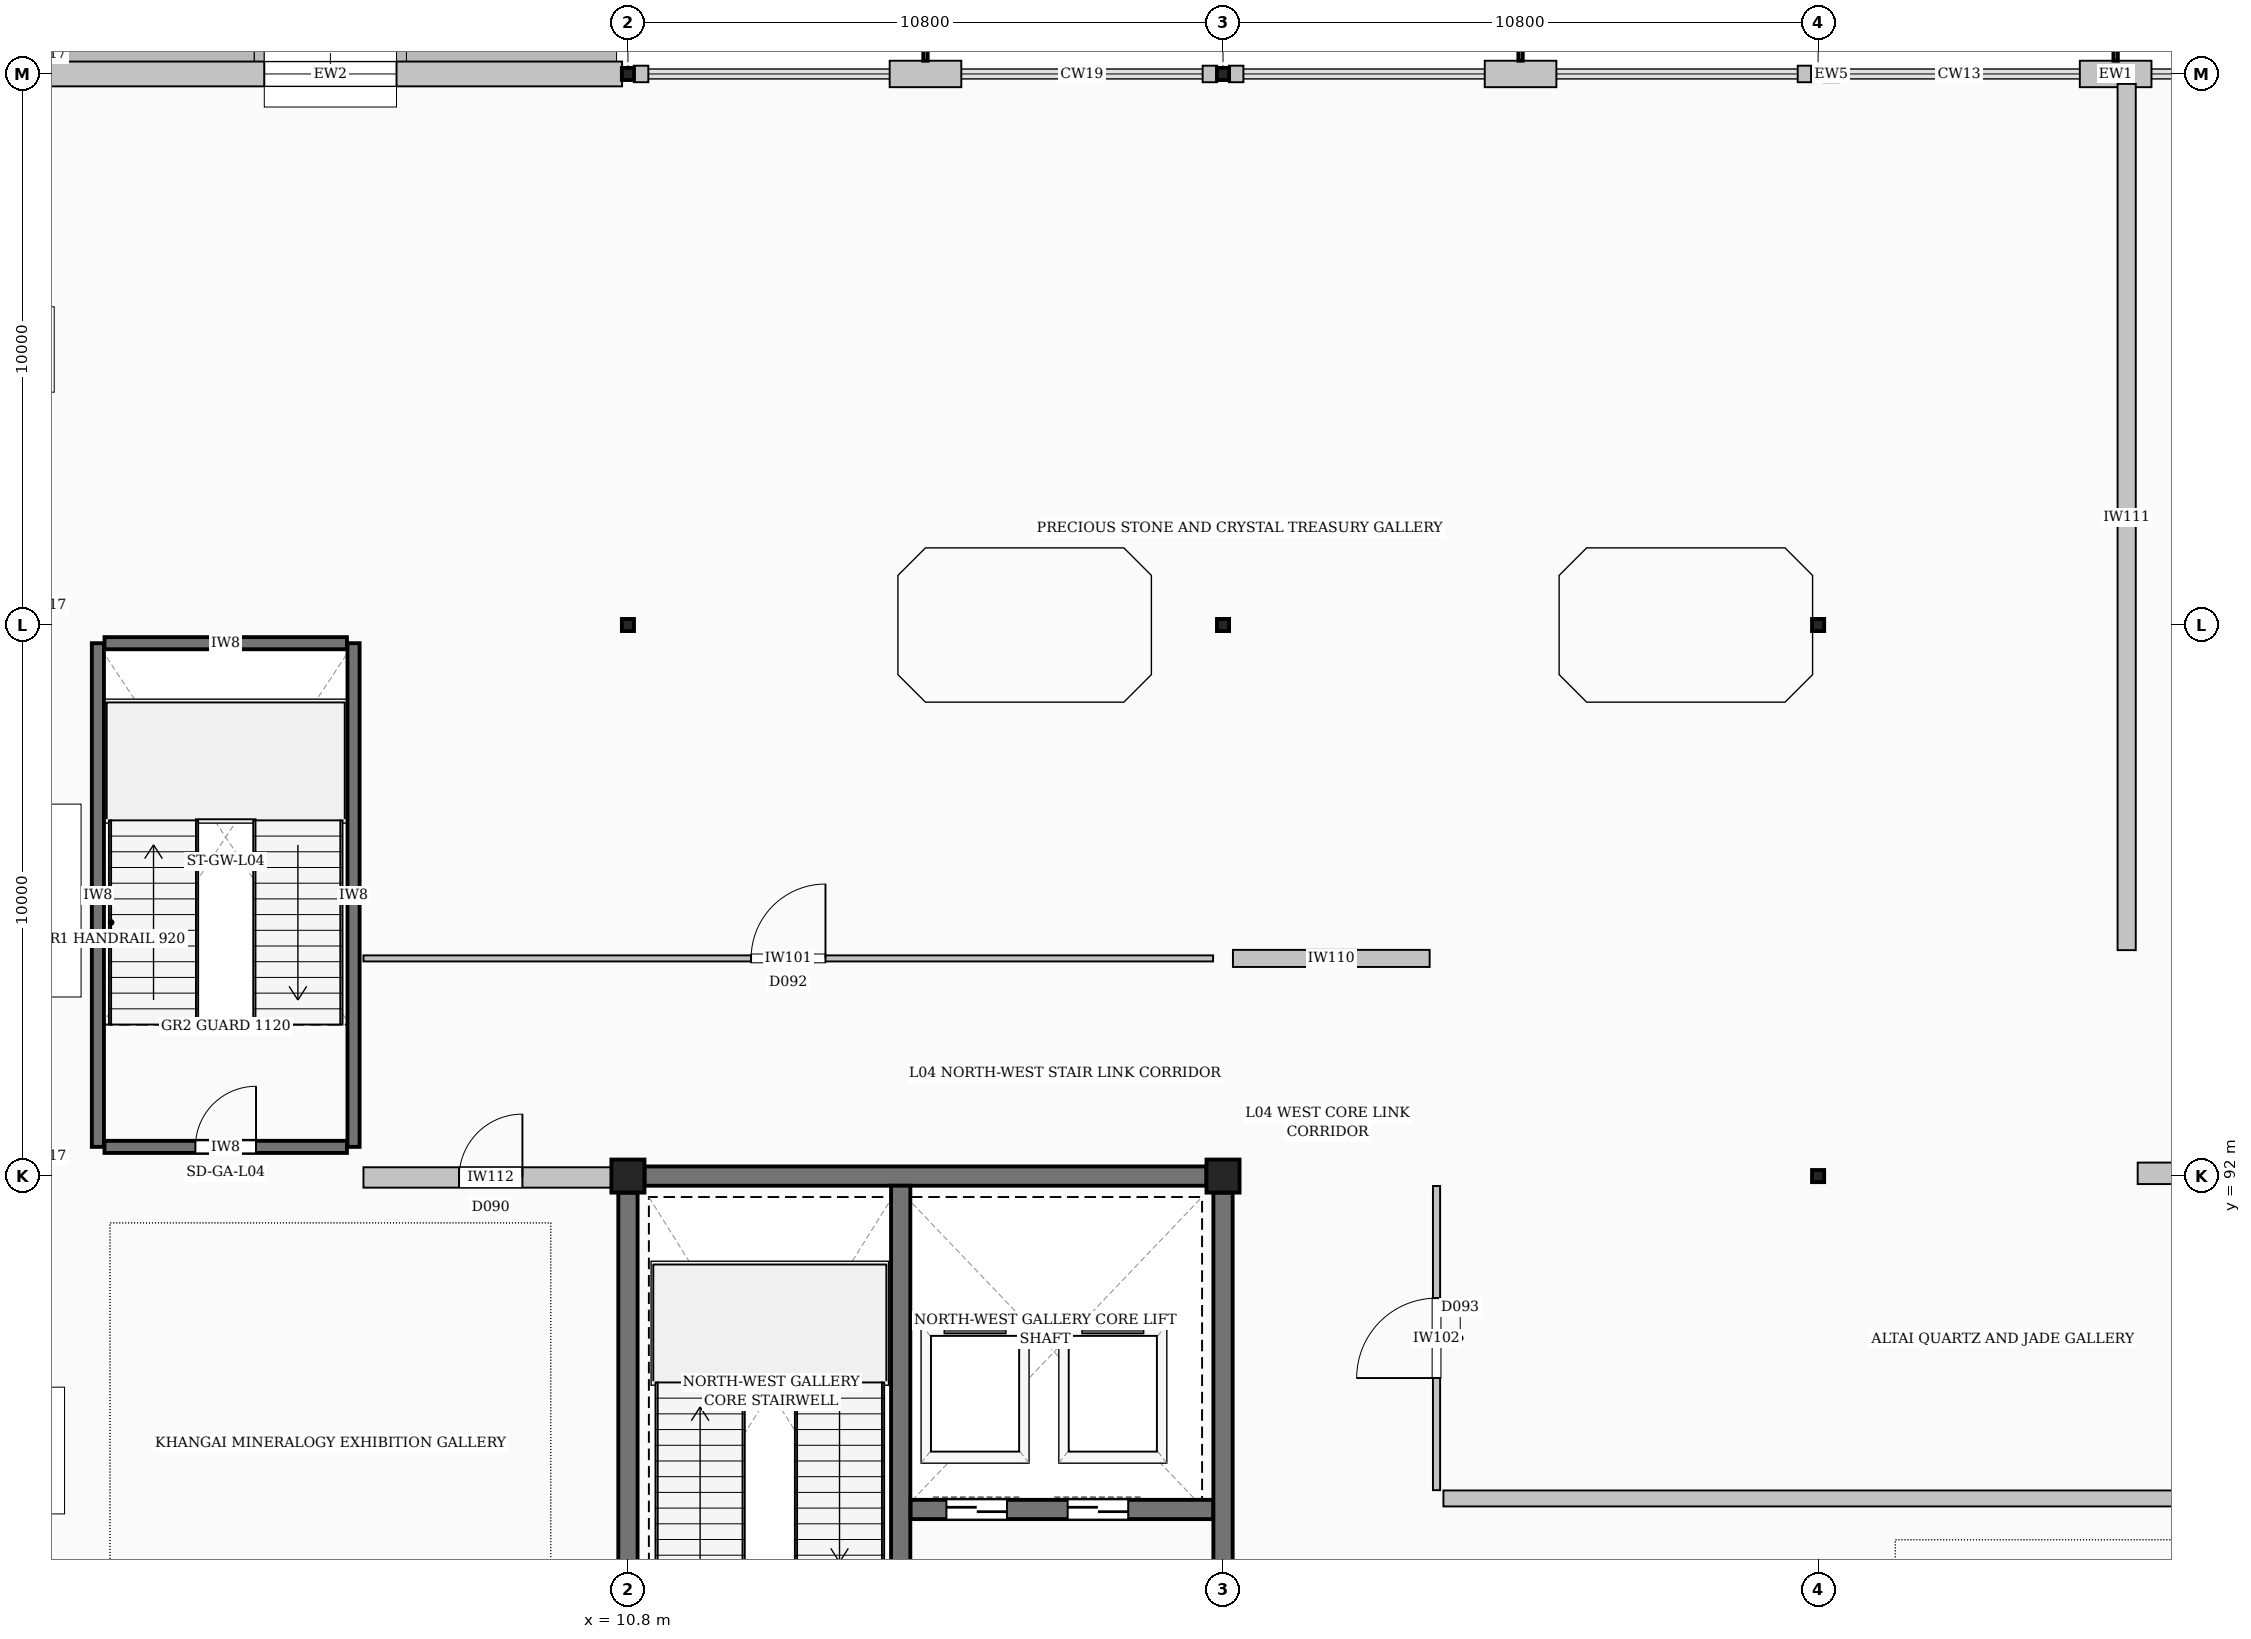
"""IFC4 building model, lengths in metres.
Left out: names, types, materials, properties, quantities, classifications, styles, units other than length and angle.
Written with IfcOpenShell. Run it as: python <this file> out.ifc"""

import sys

from ifc_helpers import new_model, si_unit, direction, frame, frame_2d, origin, origin_2d, place, context, subcontext, project, spatial, rectangle, hollow_rectangle, extrude, element, fill, save


model = new_model("IFC4")
c1 = context("Model", 3, precision=1e-05, world=origin(), true_north=direction((0.0, 1.0)))
c2 = subcontext(c1, "Body", "Model", "MODEL_VIEW")
j1 = project(units=[si_unit("LENGTHUNIT", "METRE"), si_unit("PLANEANGLEUNIT", "RADIAN")], contexts=[c1])
p1 = place(None, origin())
s1 = spatial("IfcSite", under=j1, at=p1, CompositionType="ELEMENT")
p2 = place(p1, origin())
s2 = spatial("IfcBuilding", under=s1, at=p2, CompositionType="ELEMENT")
p3 = place(p2, frame((0.0, 0.0, 24.0)))
s3 = spatial("IfcBuildingStorey", under=s2, at=p3, CompositionType="ELEMENT", Elevation=24.0)
p4 = place(p3, frame((10.8, 92.0, 0.0), z_axis=(0.0, 0.0, 1.0), x_axis=(1.0, 0.0, 0.0)))
e1 = element("IfcColumn", 1, at=p4, inside=s3, PredefinedType="COLUMN", context=c2, shape_type="SweptSolid", body=[
    extrude(rectangle(XDim=0.6, YDim=0.6, at=origin_2d()), origin(), (0.0, 0.0, 1.0), 4.8),
])
for number, where, z_axis, x_axis in (
    (2, (10.8, 102.0, 0.0), (0.0, 0.0, 1.0), (1.0, 0.0, 0.0)),
    (3, (10.8, 112.0, 0.0), (0.0, 0.0, 1.0), (1.0, 0.0, 0.0)),
):
    element("IfcColumn", number, at=place(p3, frame(where, z_axis=z_axis, x_axis=x_axis)), inside=s3, PredefinedType="COLUMN", context=c2, shape_type="SweptSolid", body=[
        extrude(hollow_rectangle(XDim=0.22, YDim=0.22, WallThickness=0.012, InnerFilletRadius=0.012, OuterFilletRadius=0.025, at=origin_2d()), origin(), (0.0, 0.0, 1.0), 4.8),
    ])
p5 = place(p3, frame((21.6, 92.0, 0.0), z_axis=(0.0, 0.0, 1.0), x_axis=(1.0, 0.0, 0.0)))
e4 = element("IfcColumn", 4, at=p5, inside=s3, PredefinedType="COLUMN", context=c2, shape_type="SweptSolid", body=[
    extrude(rectangle(XDim=0.6, YDim=0.6, at=origin_2d()), origin(), (0.0, 0.0, 1.0), 4.8),
])
for number, where, z_axis, x_axis in (
    (5, (21.6, 102.0, 0.0), (0.0, 0.0, 1.0), (1.0, 0.0, 0.0)),
    (6, (21.6, 112.0, 0.0), (0.0, 0.0, 1.0), (1.0, 0.0, 0.0)),
    (7, (32.4, 92.0, 0.0), (0.0, 0.0, 1.0), (1.0, 0.0, 0.0)),
    (8, (32.4, 102.0, 0.0), (0.0, 0.0, 1.0), (1.0, 0.0, 0.0)),
    (9, (32.4, 112.0, 0.0), (0.0, 0.0, 1.0), (1.0, 0.0, 0.0)),
):
    element("IfcColumn", number, at=place(p3, frame(where, z_axis=z_axis, x_axis=x_axis)), inside=s3, PredefinedType="COLUMN", context=c2, shape_type="SweptSolid", body=[
        extrude(hollow_rectangle(XDim=0.22, YDim=0.22, WallThickness=0.012, InnerFilletRadius=0.012, OuterFilletRadius=0.025, at=origin_2d()), origin(), (0.0, 0.0, 1.0), 4.8),
    ])
p6 = place(p3, frame((38.45, 112.0, 0.0), z_axis=(0.0, 0.0, 1.0), x_axis=(-1.0, 0.0, 0.0)))
e10 = element("IfcWall", 10, at=p6, inside=s3, PredefinedType="STANDARD", context=c2, shape_type="SweptSolid", body=[
    extrude(rectangle(XDim=1.3, YDim=0.48, at=frame_2d((0.65, 0.0))), origin(), (0.0, 0.0, 1.0), 4.219),
])
p7 = place(p3, frame((32.77, 112.0, 0.0), z_axis=(0.0, 0.0, 1.0), x_axis=(-1.0, 0.0, 0.0)))
e11 = element("IfcWall", 11, at=p7, inside=s3, PredefinedType="STANDARD", context=c2, shape_type="SweptSolid", body=[
    extrude(rectangle(XDim=0.264, YDim=0.3, at=frame_2d((0.132, 0.0))), origin(), (0.0, 0.0, 1.0), 4.56),
])
p8 = place(p3, frame((27.65, 112.0, 0.0), z_axis=(0.0, 0.0, 1.0), x_axis=(-1.0, 0.0, 0.0)))
e12 = element("IfcWall", 12, at=p8, inside=s3, PredefinedType="STANDARD", context=c2, shape_type="SweptSolid", body=[
    extrude(rectangle(XDim=1.3, YDim=0.48, at=frame_2d((0.65, 0.0))), origin(), (0.0, 0.0, 1.0), 4.219),
])
for number, where, z_axis, x_axis in (
    (13, (32.294, 112.0, 0.0), (0.0, 0.0, 1.0), (-1.0, 0.0, 0.0)),
    (14, (21.97, 112.0, 0.0), (0.0, 0.0, 1.0), (-1.0, 0.0, 0.0)),
):
    element("IfcWall", number, at=place(p3, frame(where, z_axis=z_axis, x_axis=x_axis)), inside=s3, PredefinedType="STANDARD", context=c2, shape_type="SweptSolid", body=[
        extrude(rectangle(XDim=0.264, YDim=0.3, at=frame_2d((0.132, 0.0))), origin(), (0.0, 0.0, 1.0), 4.56),
    ])
p9 = place(p3, frame((16.85, 112.0, 0.0), z_axis=(0.0, 0.0, 1.0), x_axis=(-1.0, 0.0, 0.0)))
e15 = element("IfcWall", 15, at=p9, inside=s3, PredefinedType="STANDARD", context=c2, shape_type="SweptSolid", body=[
    extrude(rectangle(XDim=1.3, YDim=0.48, at=frame_2d((0.65, 0.0))), origin(), (0.0, 0.0, 1.0), 4.219),
])
for number, where, z_axis, x_axis in (
    (16, (21.494, 112.0, 0.0), (0.0, 0.0, 1.0), (-1.0, 0.0, 0.0)),
    (17, (11.17, 112.0, 0.0), (0.0, 0.0, 1.0), (-1.0, 0.0, 0.0)),
):
    element("IfcWall", number, at=place(p3, frame(where, z_axis=z_axis, x_axis=x_axis)), inside=s3, PredefinedType="STANDARD", context=c2, shape_type="SweptSolid", body=[
        extrude(rectangle(XDim=0.264, YDim=0.3, at=frame_2d((0.132, 0.0))), origin(), (0.0, 0.0, 1.0), 4.56),
    ])
p10 = place(p3, frame((10.694, 112.0, 0.0), z_axis=(0.0, 0.0, 1.0), x_axis=(-1.0, 0.0, 0.0)))
e18 = element("IfcWall", 18, at=p10, inside=s3, PredefinedType="STANDARD", context=c2, shape_type="SweptSolid", body=[
    extrude(rectangle(XDim=10.588, YDim=0.45, at=frame_2d((5.294, 0.0))), origin(), (0.0, 0.0, 1.0), 4.219),
])
p11 = place(p10, frame((4.094, 0.0, 1.0)))
e19 = element("IfcOpeningElement", 19, at=p11, cuts=e18, PredefinedType="OPENING", context=c2, shape_type="SweptSolid", body=[
    extrude(rectangle(XDim=2.4, YDim=2.4, at=frame_2d((1.2, 1.2))), frame((0.0, 0.235, 0.0), z_axis=(0.0, -1.0, 0.0), x_axis=(1.0, 0.0, 0.0)), (0.0, 0.0, 1.0), 0.47),
])
p12 = place(p3, frame((11.1, 92.0, 0.0), z_axis=(0.0, 0.0, 1.0), x_axis=(1.0, 0.0, 0.0)))
e20 = element("IfcWall", 20, at=p12, inside=s3, PredefinedType="SHEAR", context=c2, shape_type="SweptSolid", body=[
    extrude(rectangle(XDim=10.2, YDim=0.35, at=frame_2d((5.1, 0.0))), origin(), (0.0, 0.0, 1.0), 4.56),
])
p13 = place(p3, frame((10.8, 82.3, 0.0), z_axis=(0.0, 0.0, 1.0), x_axis=(0.0, 1.0, 0.0)))
e21 = element("IfcWall", 21, at=p13, inside=s3, PredefinedType="SHEAR", context=c2, shape_type="SweptSolid", body=[
    extrude(rectangle(XDim=9.4, YDim=0.35, at=frame_2d((4.7, 0.0))), origin(), (0.0, 0.0, 1.0), 4.56),
])
p14 = place(p3, frame((21.6, 82.3, 0.0), z_axis=(0.0, 0.0, 1.0), x_axis=(0.0, 1.0, 0.0)))
e22 = element("IfcWall", 22, at=p14, inside=s3, PredefinedType="SHEAR", context=c2, shape_type="SweptSolid", body=[
    extrude(rectangle(XDim=9.4, YDim=0.35, at=frame_2d((4.7, 0.0))), origin(), (0.0, 0.0, 1.0), 4.56),
])
p15 = place(p14, frame((0.88, 0.0, 0.0)))
e23 = element("IfcOpeningElement", 23, at=p15, cuts=e22, PredefinedType="OPENING", context=c2, shape_type="SweptSolid", body=[
    extrude(rectangle(XDim=1.8, YDim=2.25, at=frame_2d((0.9, 1.125))), frame((0.0, 0.185, 0.0), z_axis=(0.0, -1.0, 0.0), x_axis=(1.0, 0.0, 0.0)), (0.0, 0.0, 1.0), 0.37),
])
p16 = place(p3, frame((15.75, 82.22, 0.0), z_axis=(0.0, 0.0, 1.0), x_axis=(0.0, 1.0, 0.0)))
e24 = element("IfcWall", 24, at=p16, inside=s3, PredefinedType="SHEAR", context=c2, shape_type="SweptSolid", body=[
    extrude(rectangle(XDim=9.605, YDim=0.35, at=frame_2d((4.802, 0.0))), origin(), (0.0, 0.0, 1.0), 4.56),
])
p17 = place(p16, frame((0.9, 0.0, 0.0)))
e25 = element("IfcOpeningElement", 25, at=p17, cuts=e24, PredefinedType="OPENING", context=c2, shape_type="SweptSolid", body=[
    extrude(rectangle(XDim=1.1, YDim=2.2, at=frame_2d((0.55, 1.1))), frame((0.0, 0.185, 0.0), z_axis=(0.0, -1.0, 0.0), x_axis=(1.0, 0.0, 0.0)), (0.0, 0.0, 1.0), 0.37),
])
p18 = place(p3, frame((15.93, 85.95, 0.0), z_axis=(0.0, 0.0, 1.0), x_axis=(1.0, 0.0, 0.0)))
e26 = element("IfcWall", 26, at=p18, inside=s3, PredefinedType="SHEAR", context=c2, shape_type="SweptSolid", body=[
    extrude(rectangle(XDim=5.49, YDim=0.35, at=frame_2d((2.745, 0.0))), origin(), (0.0, 0.0, 1.0), 4.56),
])
p19 = place(p18, frame((0.65, 0.0, 0.0)))
e27 = element("IfcOpeningElement", 27, at=p19, cuts=e26, PredefinedType="OPENING", context=c2, shape_type="SweptSolid", body=[
    extrude(rectangle(XDim=1.1, YDim=2.2, at=frame_2d((0.55, 1.1))), frame((0.0, 0.185, 0.0), z_axis=(0.0, -1.0, 0.0), x_axis=(1.0, 0.0, 0.0)), (0.0, 0.0, 1.0), 0.37),
])
p20 = place(p18, frame((2.85, 0.0, 0.0)))
e28 = element("IfcOpeningElement", 28, at=p20, cuts=e26, PredefinedType="OPENING", context=c2, shape_type="SweptSolid", body=[
    extrude(rectangle(XDim=1.1, YDim=2.2, at=frame_2d((0.55, 1.1))), frame((0.0, 0.185, 0.0), z_axis=(0.0, -1.0, 0.0), x_axis=(1.0, 0.0, 0.0)), (0.0, 0.0, 1.0), 0.37),
])
for number, where, z_axis, x_axis in (
    (29, (1.18, 92.53, 0.0), (0.0, 0.0, 1.0), (0.0, 1.0, 0.0)),
    (30, (5.82, 92.53, 0.0), (0.0, 0.0, 1.0), (0.0, 1.0, 0.0)),
):
    element("IfcWall", number, at=place(p3, frame(where, z_axis=z_axis, x_axis=x_axis)), inside=s3, PredefinedType="SHEAR", context=c2, shape_type="SweptSolid", body=[
        extrude(rectangle(XDim=9.14, YDim=0.22, at=frame_2d((4.57, 0.0))), origin(), (0.0, 0.0, 1.0), 4.56),
    ])
p21 = place(p3, frame((1.3, 101.67, 0.0), z_axis=(0.0, 0.0, 1.0), x_axis=(1.0, 0.0, 0.0)))
e31 = element("IfcWall", 31, at=p21, inside=s3, PredefinedType="SHEAR", context=c2, shape_type="SweptSolid", body=[
    extrude(rectangle(XDim=4.4, YDim=0.22, at=frame_2d((2.2, 0.0))), origin(), (0.0, 0.0, 1.0), 4.56),
])
p22 = place(p3, frame((1.3, 92.53, 0.0), z_axis=(0.0, 0.0, 1.0), x_axis=(1.0, 0.0, 0.0)))
e32 = element("IfcWall", 32, at=p22, inside=s3, PredefinedType="SHEAR", context=c2, shape_type="SweptSolid", body=[
    extrude(rectangle(XDim=4.4, YDim=0.22, at=frame_2d((2.2, 0.0))), origin(), (0.0, 0.0, 1.0), 4.56),
])
p23 = place(p22, frame((1.65, 0.0, 0.0)))
e33 = element("IfcOpeningElement", 33, at=p23, cuts=e32, PredefinedType="OPENING", context=c2, shape_type="SweptSolid", body=[
    extrude(rectangle(XDim=1.1, YDim=2.2, at=frame_2d((0.55, 1.1))), frame((0.0, 0.12, 0.0), z_axis=(0.0, -1.0, 0.0), x_axis=(1.0, 0.0, 0.0)), (0.0, 0.0, 1.0), 0.24),
])
p24 = place(p3, frame((25.6, 86.15, 0.0), z_axis=(0.0, 0.0, 1.0), x_axis=(1.0, 0.0, 0.0)))
e34 = element("IfcWall", 34, at=p24, inside=s3, PredefinedType="PARTITIONING", context=c2, shape_type="SweptSolid", body=[
    extrude(rectangle(XDim=28.22, YDim=0.29, at=frame_2d((14.11, 0.0))), origin(), (0.0, 0.0, 1.0), 4.52),
])
p25 = place(p24, frame((13.59, 0.0, 0.0)))
e35 = element("IfcOpeningElement", 35, at=p25, cuts=e34, PredefinedType="OPENING", context=c2, shape_type="SweptSolid", body=[
    extrude(rectangle(XDim=1.04, YDim=2.2, at=frame_2d((0.52, 1.1))), frame((0.0, 0.155, 0.0), z_axis=(0.0, -1.0, 0.0), x_axis=(1.0, 0.0, 0.0)), (0.0, 0.0, 1.0), 0.31),
])
p26 = place(p3, frame((6.0, 91.975, 0.0), z_axis=(0.0, 0.0, 1.0), x_axis=(1.0, 0.0, 0.0)))
e36 = element("IfcWall", 36, at=p26, inside=s3, PredefinedType="PARTITIONING", context=c2, shape_type="SweptSolid", body=[
    extrude(rectangle(XDim=4.62, YDim=0.37, at=frame_2d((2.31, 0.0))), origin(), (0.0, 0.0, 1.0), 4.17),
])
p27 = place(p26, frame((1.735, 0.0, 0.0)))
e37 = element("IfcOpeningElement", 37, at=p27, cuts=e36, PredefinedType="OPENING", context=c2, shape_type="SweptSolid", body=[
    extrude(rectangle(XDim=1.15, YDim=2.25, at=frame_2d((0.575, 1.125))), frame((0.0, 0.195, 0.0), z_axis=(0.0, -1.0, 0.0), x_axis=(1.0, 0.0, 0.0)), (0.0, 0.0, 1.0), 0.39),
])
p28 = place(p3, frame((38.2, 92.05, 0.0), z_axis=(0.0, 0.0, 1.0), x_axis=(1.0, 0.0, 0.0)))
e38 = element("IfcWall", 38, at=p28, inside=s3, PredefinedType="PARTITIONING", context=c2, shape_type="SweptSolid", body=[
    extrude(rectangle(XDim=4.8, YDim=0.39, at=frame_2d((2.4, 0.0))), origin(), (0.0, 0.0, 1.0), 4.17),
])
p29 = place(p3, frame((6.0, 95.95, 0.0), z_axis=(0.0, 0.0, 1.0), x_axis=(1.0, 0.0, 0.0)))
e39 = element("IfcWall", 39, at=p29, inside=s3, PredefinedType="PARTITIONING", context=c2, shape_type="SweptSolid", body=[
    extrude(rectangle(XDim=15.42, YDim=0.11, at=frame_2d((7.71, 0.0))), origin(), (0.0, 0.0, 1.0), 4.52),
])
p30 = place(p29, frame((7.035, 0.0, 0.0)))
e40 = element("IfcOpeningElement", 40, at=p30, cuts=e39, PredefinedType="OPENING", context=c2, shape_type="SweptSolid", body=[
    extrude(rectangle(XDim=1.35, YDim=2.35, at=frame_2d((0.675, 1.175))), frame((0.0, 0.065, 0.0), z_axis=(0.0, -1.0, 0.0), x_axis=(1.0, 0.0, 0.0)), (0.0, 0.0, 1.0), 0.13),
])
p31 = place(p3, frame((25.475, 86.3, 0.0), z_axis=(0.0, 0.0, 1.0), x_axis=(0.0, 1.0, 0.0)))
e41 = element("IfcWall", 41, at=p31, inside=s3, PredefinedType="PARTITIONING", context=c2, shape_type="SweptSolid", body=[
    extrude(rectangle(XDim=5.52, YDim=0.13, at=frame_2d((2.76, 0.0))), origin(), (0.0, 0.0, 1.0), 4.52),
])
p32 = place(p31, frame((2.035, 0.0, 0.0)))
e42 = element("IfcOpeningElement", 42, at=p32, cuts=e41, PredefinedType="OPENING", context=c2, shape_type="SweptSolid", body=[
    extrude(rectangle(XDim=1.45, YDim=2.35, at=frame_2d((0.725, 1.175))), frame((0.0, 0.075, 0.0), z_axis=(0.0, -1.0, 0.0), x_axis=(1.0, 0.0, 0.0)), (0.0, 0.0, 1.0), 0.15),
])
p33 = place(p3, frame((21.78, 95.95, 0.0), z_axis=(0.0, 0.0, 1.0), x_axis=(1.0, 0.0, 0.0)))
e43 = element("IfcWall", 43, at=p33, inside=s3, PredefinedType="PARTITIONING", context=c2, shape_type="SweptSolid", body=[
    extrude(rectangle(XDim=3.57, YDim=0.31, at=frame_2d((1.785, 0.0))), origin(), (0.0, 0.0, 1.0), 4.52),
])
p34 = place(p3, frame((38.0, 96.1, 0.0), z_axis=(0.0, 0.0, 1.0), x_axis=(0.0, 1.0, 0.0)))
e44 = element("IfcWall", 44, at=p34, inside=s3, PredefinedType="PARTITIONING", context=c2, shape_type="SweptSolid", body=[
    extrude(rectangle(XDim=15.72, YDim=0.33, at=frame_2d((7.86, 0.0))), origin(), (0.0, 0.0, 1.0), 4.52),
])
p35 = place(p11, origin())
e45 = element("IfcWindow", 45, at=p35, inside=s3, PartitioningType="SINGLE_PANEL", PredefinedType="WINDOW", context=c2, shape_type="SweptSolid", body=[
    extrude(rectangle(XDim=2.4, YDim=2.4, at=frame_2d((1.2, 1.2))), frame((0.0, 0.03, 0.0), z_axis=(0.0, -1.0, 0.0), x_axis=(1.0, 0.0, 0.0)), (0.0, 0.0, 1.0), 0.06),
])
fill(e19, e45)
p36 = place(p19, origin())
e46 = element("IfcDoor", 46, at=p36, inside=s3, OperationType="DOUBLE_DOOR_SLIDING", PredefinedType="DOOR", context=c2, shape_type="SweptSolid", body=[
    extrude(rectangle(XDim=1.1, YDim=2.2, at=frame_2d((0.55, 1.1))), frame((0.0, 0.025, 0.0), z_axis=(0.0, -1.0, 0.0), x_axis=(1.0, 0.0, 0.0)), (0.0, 0.0, 1.0), 0.05),
])
fill(e27, e46)
p37 = place(p20, origin())
e47 = element("IfcDoor", 47, at=p37, inside=s3, OperationType="DOUBLE_DOOR_SLIDING", PredefinedType="DOOR", context=c2, shape_type="SweptSolid", body=[
    extrude(rectangle(XDim=1.1, YDim=2.2, at=frame_2d((0.55, 1.1))), frame((0.0, 0.025, 0.0), z_axis=(0.0, -1.0, 0.0), x_axis=(1.0, 0.0, 0.0)), (0.0, 0.0, 1.0), 0.05),
])
fill(e28, e47)
p38 = place(p23, origin())
e48 = element("IfcDoor", 48, at=p38, inside=s3, OperationType="SINGLE_SWING_RIGHT", PredefinedType="DOOR", context=c2, shape_type="SweptSolid", body=[
    extrude(rectangle(XDim=1.1, YDim=2.2, at=frame_2d((0.55, 1.1))), frame((0.0, 0.025, 0.0), z_axis=(0.0, -1.0, 0.0), x_axis=(1.0, 0.0, 0.0)), (0.0, 0.0, 1.0), 0.05),
])
fill(e33, e48)
p39 = place(p27, origin())
e49 = element("IfcDoor", 49, at=p39, inside=s3, OperationType="SINGLE_SWING_RIGHT", PredefinedType="DOOR", context=c2, shape_type="SweptSolid", body=[
    extrude(rectangle(XDim=1.15, YDim=2.25, at=frame_2d((0.575, 1.125))), frame((0.0, 0.025, 0.0), z_axis=(0.0, -1.0, 0.0), x_axis=(1.0, 0.0, 0.0)), (0.0, 0.0, 1.0), 0.05),
])
fill(e37, e49)
p40 = place(p30, origin())
e50 = element("IfcDoor", 50, at=p40, inside=s3, OperationType="SINGLE_SWING_RIGHT", PredefinedType="DOOR", context=c2, shape_type="SweptSolid", body=[
    extrude(rectangle(XDim=1.35, YDim=2.35, at=frame_2d((0.675, 1.175))), frame((0.0, 0.025, 0.0), z_axis=(0.0, -1.0, 0.0), x_axis=(1.0, 0.0, 0.0)), (0.0, 0.0, 1.0), 0.05),
])
fill(e40, e50)
p41 = place(p32, origin())
e51 = element("IfcDoor", 51, at=p41, inside=s3, OperationType="SINGLE_SWING_LEFT", PredefinedType="DOOR", context=c2, shape_type="SweptSolid", body=[
    extrude(rectangle(XDim=1.45, YDim=2.35, at=frame_2d((0.725, 1.175))), frame((0.0, 0.025, 0.0), z_axis=(0.0, -1.0, 0.0), x_axis=(1.0, 0.0, 0.0)), (0.0, 0.0, 1.0), 0.05),
])
fill(e42, e51)
save(model, sys.argv[1])
